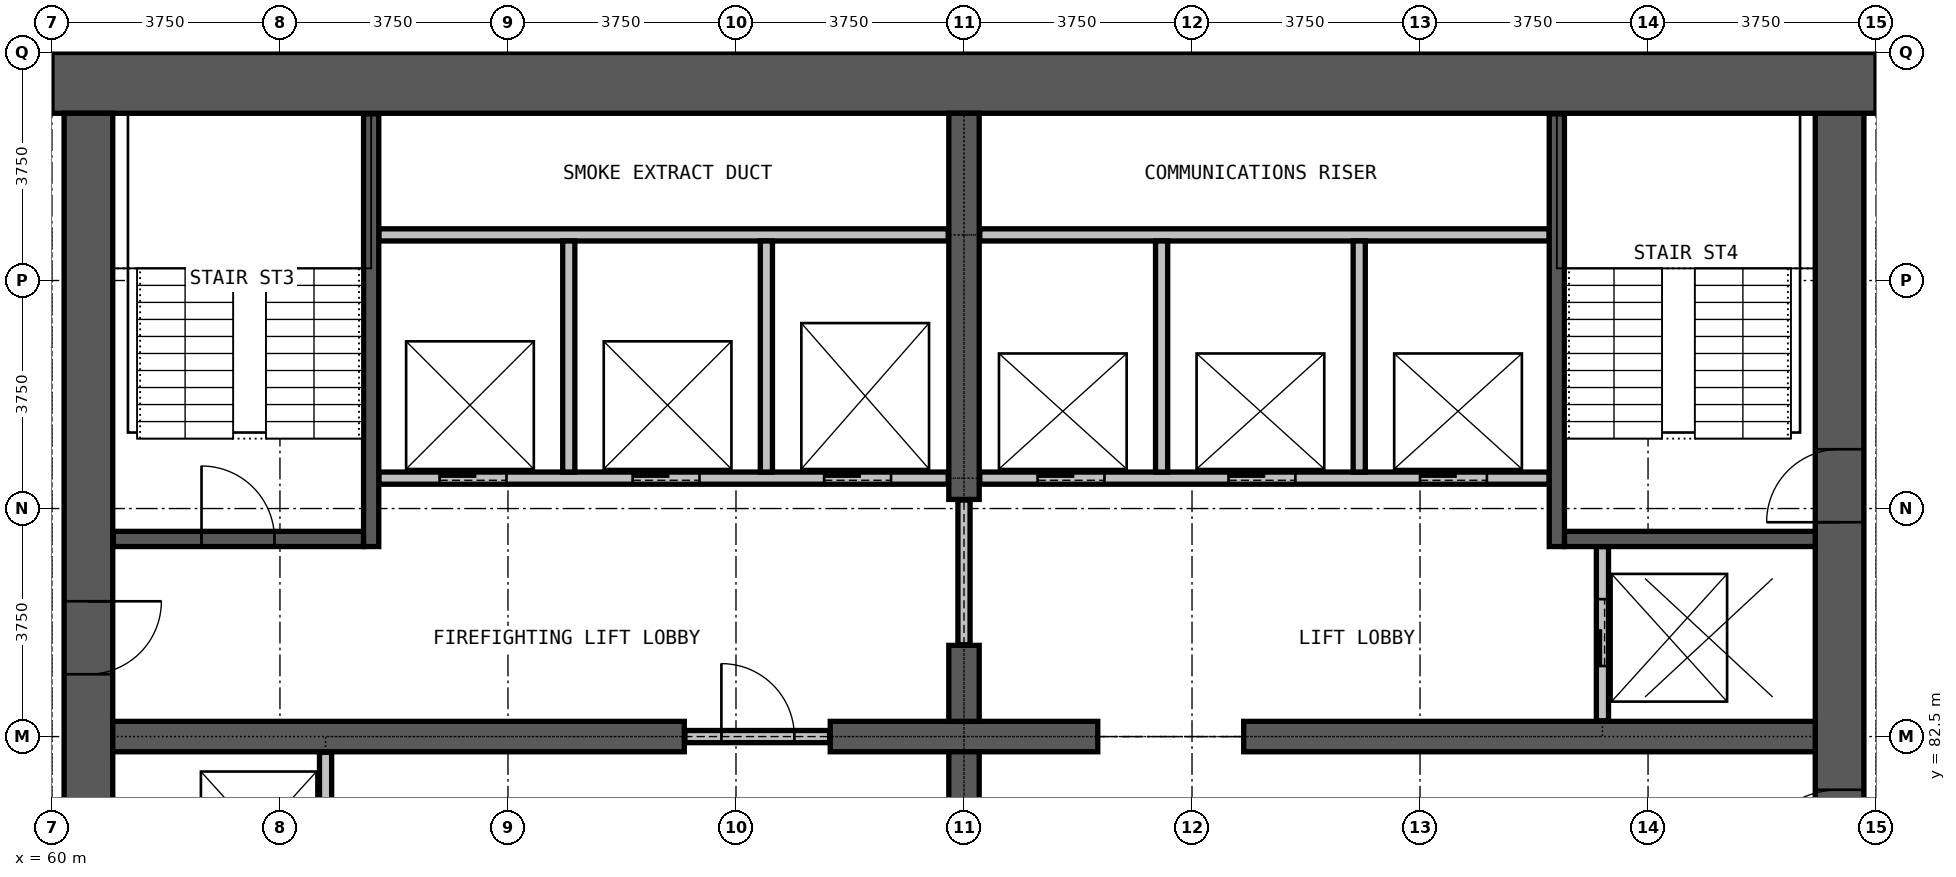
"""IFC4 building model, lengths in metres.
Left out: names, types, materials, properties, quantities, classifications, styles, units other than length and angle.
Written with IfcOpenShell. Run it as: python <this file> out.ifc"""

import sys

from ifc_helpers import new_model, si_unit, direction, frame, frame_2d, origin, place, context, subcontext, project, spatial, rectangle, extrude, element, fill, save


model = new_model("IFC4")
c1 = context("Model", 3, precision=1e-05, world=origin(), true_north=direction((0.0, 1.0)))
c2 = subcontext(c1, "Body", "Model", "MODEL_VIEW")
j1 = project(units=[si_unit("LENGTHUNIT", "METRE"), si_unit("PLANEANGLEUNIT", "RADIAN")], contexts=[c1])
p1 = place(None, origin())
s1 = spatial("IfcSite", under=j1, at=p1, CompositionType="ELEMENT")
p2 = place(p1, origin())
s2 = spatial("IfcBuilding", under=s1, at=p2, CompositionType="ELEMENT")
p3 = place(p2, frame((0.0, 0.0, 158.5)))
s3 = spatial("IfcBuildingStorey", under=s2, at=p3, CompositionType="ELEMENT", Elevation=158.5)
p4 = place(p3, frame((89.4, 72.25, 0.0), z_axis=(0.0, 0.0, 1.0), x_axis=(0.0, 1.0, 0.0)))
e1 = element("IfcWall", 1, at=p4, inside=s3, PredefinedType="SHEAR", context=c2, shape_type="SweptSolid", body=[
    extrude(rectangle(XDim=20.5, YDim=0.8, at=frame_2d((10.25, 0.0))), origin(), (0.0, 0.0, 1.0), 3.6),
])
p5 = place(p4, frame((0.275, 0.0, 0.0)))
e2 = element("IfcOpeningElement", 2, at=p5, cuts=e1, PredefinedType="OPENING", context=c2, shape_type="SweptSolid", body=[
    extrude(rectangle(XDim=1.2, YDim=2.2, at=frame_2d((0.6, 1.1))), frame((0.0, 0.41, 0.0), z_axis=(0.0, -1.0, 0.0), x_axis=(1.0, 0.0, 0.0)), (0.0, 0.0, 1.0), 0.82),
])
p6 = place(p4, frame((13.775, 0.0, 0.0)))
e3 = element("IfcOpeningElement", 3, at=p6, cuts=e1, PredefinedType="OPENING", context=c2, shape_type="SweptSolid", body=[
    extrude(rectangle(XDim=1.2, YDim=2.2, at=frame_2d((0.6, 1.1))), frame((0.0, 0.41, 0.0), z_axis=(0.0, -1.0, 0.0), x_axis=(1.0, 0.0, 0.0)), (0.0, 0.0, 1.0), 0.82),
])
p7 = place(p4, frame((7.875, 0.0, 0.0)))
e4 = element("IfcOpeningElement", 4, at=p7, cuts=e1, PredefinedType="OPENING", context=c2, shape_type="SweptSolid", body=[
    extrude(rectangle(XDim=1.5, YDim=2.2, at=frame_2d((0.75, 1.1))), frame((0.0, 0.41, 0.0), z_axis=(0.0, -1.0, 0.0), x_axis=(1.0, 0.0, 0.0)), (0.0, 0.0, 1.0), 0.82),
])
p8 = place(p3, frame((90.0, 93.25, 0.0), z_axis=(0.0, 0.0, 1.0), x_axis=(-1.0, 0.0, 0.0)))
e5 = element("IfcWall", 5, at=p8, inside=s3, PredefinedType="SHEAR", context=c2, shape_type="SweptSolid", body=[
    extrude(rectangle(XDim=30.0, YDim=1.0, at=frame_2d((15.0, 0.0))), origin(), (0.0, 0.0, 1.0), 3.6),
])
p9 = place(p3, frame((60.6, 92.75, 0.0), z_axis=(0.0, 0.0, 1.0), x_axis=(0.0, -1.0, 0.0)))
e6 = element("IfcWall", 6, at=p9, inside=s3, PredefinedType="SHEAR", context=c2, shape_type="SweptSolid", body=[
    extrude(rectangle(XDim=20.5, YDim=0.8, at=frame_2d((10.25, 0.0))), origin(), (0.0, 0.0, 1.0), 3.6),
])
p10 = place(p9, frame((19.025, 0.0, 0.0)))
e7 = element("IfcOpeningElement", 7, at=p10, cuts=e6, PredefinedType="OPENING", context=c2, shape_type="SweptSolid", body=[
    extrude(rectangle(XDim=1.2, YDim=2.2, at=frame_2d((0.6, 1.1))), frame((0.0, 0.41, 0.0), z_axis=(0.0, -1.0, 0.0), x_axis=(1.0, 0.0, 0.0)), (0.0, 0.0, 1.0), 0.82),
])
p11 = place(p9, frame((8.025, 0.0, 0.0)))
e8 = element("IfcOpeningElement", 8, at=p11, cuts=e6, PredefinedType="OPENING", context=c2, shape_type="SweptSolid", body=[
    extrude(rectangle(XDim=1.2, YDim=2.2, at=frame_2d((0.6, 1.1))), frame((0.0, 0.41, 0.0), z_axis=(0.0, -1.0, 0.0), x_axis=(1.0, 0.0, 0.0)), (0.0, 0.0, 1.0), 0.82),
])
p12 = place(p3, frame((61.0, 82.5, 0.0), z_axis=(0.0, 0.0, 1.0), x_axis=(1.0, 0.0, 0.0)))
e9 = element("IfcWall", 9, at=p12, inside=s3, PredefinedType="SHEAR", context=c2, shape_type="SweptSolid", body=[
    extrude(rectangle(XDim=9.4, YDim=0.5, at=frame_2d((4.7, 0.0))), origin(), (0.0, 0.0, 1.0), 3.6),
])
p13 = place(p3, frame((72.8, 82.5, 0.0), z_axis=(0.0, 0.0, 1.0), x_axis=(1.0, 0.0, 0.0)))
e10 = element("IfcWall", 10, at=p13, inside=s3, PredefinedType="SHEAR", context=c2, shape_type="SweptSolid", body=[
    extrude(rectangle(XDim=4.4, YDim=0.5, at=frame_2d((2.2, 0.0))), origin(), (0.0, 0.0, 1.0), 3.6),
])
p14 = place(p3, frame((79.6, 82.5, 0.0), z_axis=(0.0, 0.0, 1.0), x_axis=(1.0, 0.0, 0.0)))
e11 = element("IfcWall", 11, at=p14, inside=s3, PredefinedType="SHEAR", context=c2, shape_type="SweptSolid", body=[
    extrude(rectangle(XDim=9.4, YDim=0.5, at=frame_2d((4.7, 0.0))), origin(), (0.0, 0.0, 1.0), 3.6),
])
for number, where, z_axis, x_axis in (
    (12, (75.0, 81.0, 0.0), (0.0, 0.0, 1.0), (0.0, 1.0, 0.0)),
    (13, (75.0, 82.75, 0.0), (0.0, 0.0, 1.0), (0.0, 1.0, 0.0)),
):
    element("IfcWall", number, at=place(p3, frame(where, z_axis=z_axis, x_axis=x_axis)), inside=s3, PredefinedType="SHEAR", context=c2, shape_type="SweptSolid", body=[
        extrude(rectangle(XDim=1.25, YDim=0.5, at=frame_2d((0.625, 0.0))), origin(), (0.0, 0.0, 1.0), 3.6),
    ])
p15 = place(p3, frame((75.0, 86.4, 0.0), z_axis=(0.0, 0.0, 1.0), x_axis=(0.0, 1.0, 0.0)))
e14 = element("IfcWall", 14, at=p15, inside=s3, PredefinedType="SHEAR", context=c2, shape_type="SweptSolid", body=[
    extrude(rectangle(XDim=6.35, YDim=0.5, at=frame_2d((3.175, 0.0))), origin(), (0.0, 0.0, 1.0), 3.6),
])
p16 = place(p3, frame((70.41, 82.5, 0.0), z_axis=(0.0, 0.0, 1.0), x_axis=(1.0, 0.0, 0.0)))
e15 = element("IfcWall", 15, at=p16, inside=s3, PredefinedType="PARTITIONING", context=c2, shape_type="SweptSolid", body=[
    extrude(rectangle(XDim=2.38, YDim=0.2, at=frame_2d((1.19, 0.0))), origin(), (0.0, 0.0, 1.0), 2.4),
])
p17 = place(p16, frame((0.6, 0.0, 0.0)))
e16 = element("IfcOpeningElement", 16, at=p17, cuts=e15, PredefinedType="OPENING", context=c2, shape_type="SweptSolid", body=[
    extrude(rectangle(XDim=1.2, YDim=2.2, at=frame_2d((0.6, 1.1))), frame((0.0, 0.11, 0.0), z_axis=(0.0, -1.0, 0.0), x_axis=(1.0, 0.0, 0.0)), (0.0, 0.0, 1.0), 0.22),
])
p18 = place(p3, frame((75.0, 84.01, 0.0), z_axis=(0.0, 0.0, 1.0), x_axis=(0.0, 1.0, 0.0)))
e17 = element("IfcWall", 17, at=p18, inside=s3, PredefinedType="PARTITIONING", context=c2, shape_type="SweptSolid", body=[
    extrude(rectangle(XDim=2.38, YDim=0.2, at=frame_2d((1.19, 0.0))), origin(), (0.0, 0.0, 1.0), 2.4),
])
p19 = place(p3, frame((65.375, 86.75, 0.0), z_axis=(0.0, 0.0, 1.0), x_axis=(1.0, 0.0, 0.0)))
e18 = element("IfcWall", 18, at=p19, inside=s3, PredefinedType="PARTITIONING", context=c2, shape_type="SweptSolid", body=[
    extrude(rectangle(XDim=9.365, YDim=0.2, at=frame_2d((4.683, 0.0))), origin(), (0.0, 0.0, 1.0), 3.3),
])
p20 = place(p19, frame((1.0, 0.0, 0.0)))
e19 = element("IfcOpeningElement", 19, at=p20, cuts=e18, PredefinedType="OPENING", context=c2, shape_type="SweptSolid", body=[
    extrude(rectangle(XDim=1.1, YDim=2.2, at=frame_2d((0.55, 1.1))), frame((0.0, 0.11, 0.0), z_axis=(0.0, -1.0, 0.0), x_axis=(1.0, 0.0, 0.0)), (0.0, 0.0, 1.0), 0.22),
])
p21 = place(p19, frame((4.175, 0.0, 0.0)))
e20 = element("IfcOpeningElement", 20, at=p21, cuts=e18, PredefinedType="OPENING", context=c2, shape_type="SweptSolid", body=[
    extrude(rectangle(XDim=1.1, YDim=2.2, at=frame_2d((0.55, 1.1))), frame((0.0, 0.11, 0.0), z_axis=(0.0, -1.0, 0.0), x_axis=(1.0, 0.0, 0.0)), (0.0, 0.0, 1.0), 0.22),
])
p22 = place(p19, frame((7.325, 0.0, 0.0)))
e21 = element("IfcOpeningElement", 21, at=p22, cuts=e18, PredefinedType="OPENING", context=c2, shape_type="SweptSolid", body=[
    extrude(rectangle(XDim=1.1, YDim=2.2, at=frame_2d((0.55, 1.1))), frame((0.0, 0.11, 0.0), z_axis=(0.0, -1.0, 0.0), x_axis=(1.0, 0.0, 0.0)), (0.0, 0.0, 1.0), 0.22),
])
p23 = place(p3, frame((75.26, 86.75, 0.0), z_axis=(0.0, 0.0, 1.0), x_axis=(1.0, 0.0, 0.0)))
e22 = element("IfcWall", 22, at=p23, inside=s3, PredefinedType="PARTITIONING", context=c2, shape_type="SweptSolid", body=[
    extrude(rectangle(XDim=9.365, YDim=0.2, at=frame_2d((4.683, 0.0))), origin(), (0.0, 0.0, 1.0), 3.3),
])
p24 = place(p23, frame((0.95, 0.0, 0.0)))
e23 = element("IfcOpeningElement", 23, at=p24, cuts=e22, PredefinedType="OPENING", context=c2, shape_type="SweptSolid", body=[
    extrude(rectangle(XDim=1.1, YDim=2.2, at=frame_2d((0.55, 1.1))), frame((0.0, 0.11, 0.0), z_axis=(0.0, -1.0, 0.0), x_axis=(1.0, 0.0, 0.0)), (0.0, 0.0, 1.0), 0.22),
])
p25 = place(p23, frame((4.09, 0.0, 0.0)))
e24 = element("IfcOpeningElement", 24, at=p25, cuts=e22, PredefinedType="OPENING", context=c2, shape_type="SweptSolid", body=[
    extrude(rectangle(XDim=1.1, YDim=2.2, at=frame_2d((0.55, 1.1))), frame((0.0, 0.11, 0.0), z_axis=(0.0, -1.0, 0.0), x_axis=(1.0, 0.0, 0.0)), (0.0, 0.0, 1.0), 0.22),
])
p26 = place(p23, frame((7.24, 0.0, 0.0)))
e25 = element("IfcOpeningElement", 25, at=p26, cuts=e22, PredefinedType="OPENING", context=c2, shape_type="SweptSolid", body=[
    extrude(rectangle(XDim=1.1, YDim=2.2, at=frame_2d((0.55, 1.1))), frame((0.0, 0.11, 0.0), z_axis=(0.0, -1.0, 0.0), x_axis=(1.0, 0.0, 0.0)), (0.0, 0.0, 1.0), 0.22),
])
for number, where, z_axis, x_axis in (
    (26, (65.375, 90.75, 0.0), (0.0, 0.0, 1.0), (1.0, 0.0, 0.0)),
    (27, (75.26, 90.75, 0.0), (0.0, 0.0, 1.0), (1.0, 0.0, 0.0)),
):
    element("IfcWall", number, at=place(p3, frame(where, z_axis=z_axis, x_axis=x_axis)), inside=s3, PredefinedType="PARTITIONING", context=c2, shape_type="SweptSolid", body=[
        extrude(rectangle(XDim=9.365, YDim=0.2, at=frame_2d((4.683, 0.0))), origin(), (0.0, 0.0, 1.0), 3.3),
    ])
p27 = place(p3, frame((64.5, 79.375, 0.0), z_axis=(0.0, 0.0, 1.0), x_axis=(0.0, 1.0, 0.0)))
e28 = element("IfcWall", 28, at=p27, inside=s3, PredefinedType="PARTITIONING", context=c2, shape_type="SweptSolid", body=[
    extrude(rectangle(XDim=2.865, YDim=0.2, at=frame_2d((1.433, 0.0))), origin(), (0.0, 0.0, 1.0), 3.3),
])
for number, where, z_axis, x_axis in (
    (29, (68.5, 86.85, 0.0), (0.0, 0.0, 1.0), (0.0, 1.0, 0.0)),
    (30, (71.75, 86.85, 0.0), (0.0, 0.0, 1.0), (0.0, 1.0, 0.0)),
    (31, (78.25, 86.85, 0.0), (0.0, 0.0, 1.0), (0.0, 1.0, 0.0)),
    (32, (81.5, 86.85, 0.0), (0.0, 0.0, 1.0), (0.0, 1.0, 0.0)),
):
    element("IfcWall", number, at=place(p3, frame(where, z_axis=z_axis, x_axis=x_axis)), inside=s3, PredefinedType="PARTITIONING", context=c2, shape_type="SweptSolid", body=[
        extrude(rectangle(XDim=3.8, YDim=0.2, at=frame_2d((1.9, 0.0))), origin(), (0.0, 0.0, 1.0), 3.3),
    ])
p28 = place(p3, frame((85.5, 82.76, 0.0), z_axis=(0.0, 0.0, 1.0), x_axis=(0.0, 1.0, 0.0)))
e33 = element("IfcWall", 33, at=p28, inside=s3, PredefinedType="PARTITIONING", context=c2, shape_type="SweptSolid", body=[
    extrude(rectangle(XDim=2.865, YDim=0.2, at=frame_2d((1.433, 0.0))), origin(), (0.0, 0.0, 1.0), 3.3),
])
p29 = place(p28, frame((0.9, 0.0, 0.0)))
e34 = element("IfcOpeningElement", 34, at=p29, cuts=e33, PredefinedType="OPENING", context=c2, shape_type="SweptSolid", body=[
    extrude(rectangle(XDim=1.1, YDim=2.2, at=frame_2d((0.55, 1.1))), frame((0.0, 0.11, 0.0), z_axis=(0.0, -1.0, 0.0), x_axis=(1.0, 0.0, 0.0)), (0.0, 0.0, 1.0), 0.22),
])
p30 = place(p3, frame((61.01, 85.75, 0.0), z_axis=(0.0, 0.0, 1.0), x_axis=(1.0, 0.0, 0.0)))
e35 = element("IfcWall", 35, at=p30, inside=s3, PredefinedType="PARTITIONING", context=c2, shape_type="SweptSolid", body=[
    extrude(rectangle(XDim=4.115, YDim=0.25, at=frame_2d((2.058, 0.0))), origin(), (0.0, 0.0, 1.0), 3.3),
])
p31 = place(p30, frame((1.45, 0.0, 0.0)))
e36 = element("IfcOpeningElement", 36, at=p31, cuts=e35, PredefinedType="OPENING", context=c2, shape_type="SweptSolid", body=[
    extrude(rectangle(XDim=1.2, YDim=2.2, at=frame_2d((0.6, 1.1))), frame((0.0, 0.135, 0.0), z_axis=(0.0, -1.0, 0.0), x_axis=(1.0, 0.0, 0.0)), (0.0, 0.0, 1.0), 0.27),
])
p32 = place(p3, frame((84.875, 85.75, 0.0), z_axis=(0.0, 0.0, 1.0), x_axis=(1.0, 0.0, 0.0)))
e37 = element("IfcWall", 37, at=p32, inside=s3, PredefinedType="PARTITIONING", context=c2, shape_type="SweptSolid", body=[
    extrude(rectangle(XDim=4.125, YDim=0.25, at=frame_2d((2.062, 0.0))), origin(), (0.0, 0.0, 1.0), 3.3),
])
for number, where, z_axis, x_axis in (
    (38, (65.25, 85.625, 0.0), (0.0, 0.0, 1.0), (0.0, 1.0, 0.0)),
    (39, (84.75, 85.625, 0.0), (0.0, 0.0, 1.0), (0.0, 1.0, 0.0)),
):
    element("IfcWall", number, at=place(p3, frame(where, z_axis=z_axis, x_axis=x_axis)), inside=s3, PredefinedType="PARTITIONING", context=c2, shape_type="SweptSolid", body=[
        extrude(rectangle(XDim=7.115, YDim=0.25, at=frame_2d((3.558, 0.0))), origin(), (0.0, 0.0, 1.0), 3.3),
    ])
p33 = place(p24, origin())
e40 = element("IfcDoor", 40, at=p33, inside=s3, OperationType="DOUBLE_DOOR_SLIDING", PredefinedType="DOOR", context=c2, shape_type="SweptSolid", body=[
    extrude(rectangle(XDim=1.1, YDim=2.2, at=frame_2d((0.55, 1.1))), frame((0.0, 0.025, 0.0), z_axis=(0.0, -1.0, 0.0), x_axis=(1.0, 0.0, 0.0)), (0.0, 0.0, 1.0), 0.05),
])
fill(e23, e40)
p34 = place(p25, origin())
e41 = element("IfcDoor", 41, at=p34, inside=s3, OperationType="DOUBLE_DOOR_SLIDING", PredefinedType="DOOR", context=c2, shape_type="SweptSolid", body=[
    extrude(rectangle(XDim=1.1, YDim=2.2, at=frame_2d((0.55, 1.1))), frame((0.0, 0.025, 0.0), z_axis=(0.0, -1.0, 0.0), x_axis=(1.0, 0.0, 0.0)), (0.0, 0.0, 1.0), 0.05),
])
fill(e24, e41)
p35 = place(p26, origin())
e42 = element("IfcDoor", 42, at=p35, inside=s3, OperationType="DOUBLE_DOOR_SLIDING", PredefinedType="DOOR", context=c2, shape_type="SweptSolid", body=[
    extrude(rectangle(XDim=1.1, YDim=2.2, at=frame_2d((0.55, 1.1))), frame((0.0, 0.025, 0.0), z_axis=(0.0, -1.0, 0.0), x_axis=(1.0, 0.0, 0.0)), (0.0, 0.0, 1.0), 0.05),
])
fill(e25, e42)
p36 = place(p20, origin())
e43 = element("IfcDoor", 43, at=p36, inside=s3, OperationType="DOUBLE_DOOR_SLIDING", PredefinedType="DOOR", context=c2, shape_type="SweptSolid", body=[
    extrude(rectangle(XDim=1.1, YDim=2.2, at=frame_2d((0.55, 1.1))), frame((0.0, 0.025, 0.0), z_axis=(0.0, -1.0, 0.0), x_axis=(1.0, 0.0, 0.0)), (0.0, 0.0, 1.0), 0.05),
])
fill(e19, e43)
p37 = place(p21, origin())
e44 = element("IfcDoor", 44, at=p37, inside=s3, OperationType="DOUBLE_DOOR_SLIDING", PredefinedType="DOOR", context=c2, shape_type="SweptSolid", body=[
    extrude(rectangle(XDim=1.1, YDim=2.2, at=frame_2d((0.55, 1.1))), frame((0.0, 0.025, 0.0), z_axis=(0.0, -1.0, 0.0), x_axis=(1.0, 0.0, 0.0)), (0.0, 0.0, 1.0), 0.05),
])
fill(e20, e44)
p38 = place(p22, origin())
e45 = element("IfcDoor", 45, at=p38, inside=s3, OperationType="DOUBLE_DOOR_SLIDING", PredefinedType="DOOR", context=c2, shape_type="SweptSolid", body=[
    extrude(rectangle(XDim=1.1, YDim=2.2, at=frame_2d((0.55, 1.1))), frame((0.0, 0.025, 0.0), z_axis=(0.0, -1.0, 0.0), x_axis=(1.0, 0.0, 0.0)), (0.0, 0.0, 1.0), 0.05),
])
fill(e21, e45)
p39 = place(p29, origin())
e46 = element("IfcDoor", 46, at=p39, inside=s3, OperationType="DOUBLE_DOOR_SLIDING", PredefinedType="DOOR", context=c2, shape_type="SweptSolid", body=[
    extrude(rectangle(XDim=1.1, YDim=2.2, at=frame_2d((0.55, 1.1))), frame((0.0, 0.025, 0.0), z_axis=(0.0, -1.0, 0.0), x_axis=(1.0, 0.0, 0.0)), (0.0, 0.0, 1.0), 0.05),
])
fill(e34, e46)
p40 = place(p17, origin())
e47 = element("IfcDoor", 47, at=p40, inside=s3, OperationType="SINGLE_SWING_RIGHT", PredefinedType="DOOR", context=c2, shape_type="SweptSolid", body=[
    extrude(rectangle(XDim=1.2, YDim=2.2, at=frame_2d((0.6, 1.1))), frame((0.0, 0.025, 0.0), z_axis=(0.0, -1.0, 0.0), x_axis=(1.0, 0.0, 0.0)), (0.0, 0.0, 1.0), 0.05),
])
fill(e16, e47)
p41 = place(p31, origin())
e48 = element("IfcDoor", 48, at=p41, inside=s3, OperationType="SINGLE_SWING_RIGHT", PredefinedType="DOOR", context=c2, shape_type="SweptSolid", body=[
    extrude(rectangle(XDim=1.2, YDim=2.2, at=frame_2d((0.6, 1.1))), frame((0.0, 0.025, 0.0), z_axis=(0.0, -1.0, 0.0), x_axis=(1.0, 0.0, 0.0)), (0.0, 0.0, 1.0), 0.05),
])
fill(e36, e48)
p42 = place(p6, origin())
e49 = element("IfcDoor", 49, at=p42, inside=s3, OperationType="SINGLE_SWING_LEFT", PredefinedType="DOOR", context=c2, shape_type="SweptSolid", body=[
    extrude(rectangle(XDim=1.2, YDim=2.2, at=frame_2d((0.6, 1.1))), frame((0.0, 0.025, 0.0), z_axis=(0.0, -1.0, 0.0), x_axis=(1.0, 0.0, 0.0)), (0.0, 0.0, 1.0), 0.05),
])
fill(e3, e49)
p43 = place(p7, origin())
e50 = element("IfcDoor", 50, at=p43, inside=s3, OperationType="DOUBLE_DOOR_SINGLE_SWING", PredefinedType="DOOR", context=c2, shape_type="SweptSolid", body=[
    extrude(rectangle(XDim=1.5, YDim=2.2, at=frame_2d((0.75, 1.1))), frame((0.0, 0.025, 0.0), z_axis=(0.0, -1.0, 0.0), x_axis=(1.0, 0.0, 0.0)), (0.0, 0.0, 1.0), 0.05),
])
fill(e4, e50)
p44 = place(p11, origin())
e51 = element("IfcDoor", 51, at=p44, inside=s3, OperationType="SINGLE_SWING_LEFT", PredefinedType="DOOR", context=c2, shape_type="SweptSolid", body=[
    extrude(rectangle(XDim=1.2, YDim=2.2, at=frame_2d((0.6, 1.1))), frame((0.0, 0.025, 0.0), z_axis=(0.0, -1.0, 0.0), x_axis=(1.0, 0.0, 0.0)), (0.0, 0.0, 1.0), 0.05),
])
fill(e8, e51)
save(model, sys.argv[1])
